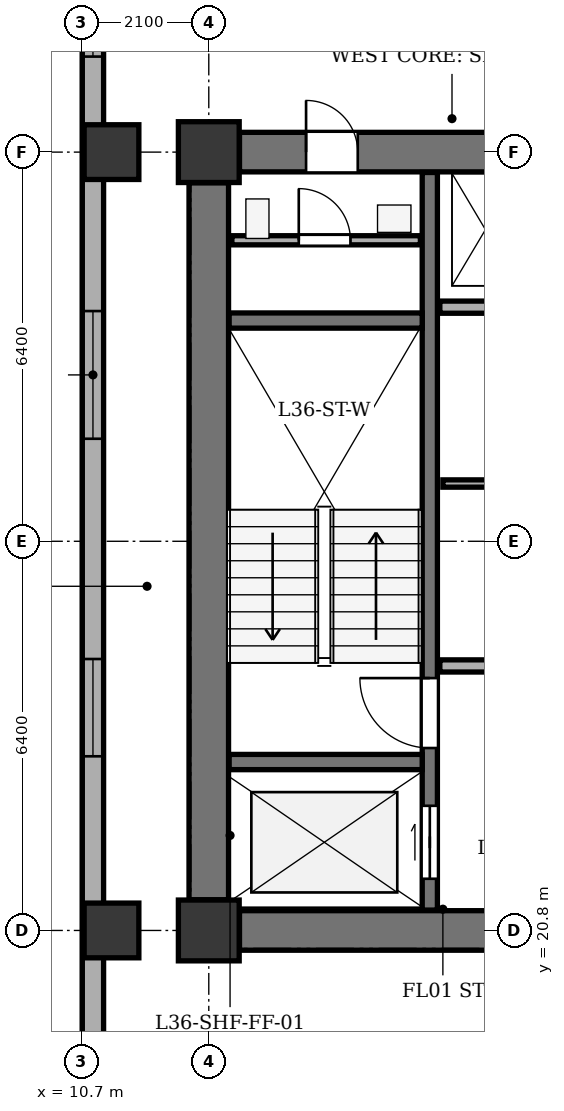
"""IFC4 building model, lengths in metres.
Left out: names, types, materials, properties, quantities, classifications, styles, units other than length and angle.
Written with IfcOpenShell. Run it as: python <this file> out.ifc"""

import sys

from ifc_helpers import new_model, si_unit, direction, frame, frame_2d, origin, origin_2d, place, context, subcontext, project, spatial, rectangle, extrude, element, fill, save


model = new_model("IFC4")
c1 = context("Model", 3, precision=1e-05, world=origin(), true_north=direction((0.0, 1.0)))
c2 = subcontext(c1, "Body", "Model", "MODEL_VIEW")
j1 = project(units=[si_unit("LENGTHUNIT", "METRE"), si_unit("PLANEANGLEUNIT", "RADIAN")], contexts=[c1])
p1 = place(None, origin())
s1 = spatial("IfcSite", under=j1, at=p1, CompositionType="ELEMENT")
p2 = place(p1, origin())
s2 = spatial("IfcBuilding", under=s1, at=p2, CompositionType="ELEMENT")
p3 = place(p2, frame((0.0, 0.0, 144.8)))
s3 = spatial("IfcBuildingStorey", under=s2, at=p3, CompositionType="ELEMENT", Elevation=144.8)
for number, where, z_axis, x_axis in (
    (1, (12.8, 20.8, 0.0), (0.0, 0.0, 1.0), (1.0, 0.0, 0.0)),
    (2, (12.8, 33.6, 0.0), (0.0, 0.0, 1.0), (1.0, 0.0, 0.0)),
):
    element("IfcColumn", number, at=place(p3, frame(where, z_axis=z_axis, x_axis=x_axis)), inside=s3, PredefinedType="COLUMN", context=c2, shape_type="SweptSolid", body=[
        extrude(rectangle(XDim=1.0, YDim=1.0, at=origin_2d()), origin(), (0.0, 0.0, 1.0), 3.5),
    ])
for number, where, z_axis, x_axis in (
    (3, (11.2, 20.8, 0.0), (0.0, 0.0, 1.0), (1.0, 0.0, 0.0)),
    (4, (11.2, 33.6, 0.0), (0.0, 0.0, 1.0), (1.0, 0.0, 0.0)),
):
    element("IfcColumn", number, at=place(p3, frame(where, z_axis=z_axis, x_axis=x_axis)), inside=s3, PredefinedType="COLUMN", context=c2, shape_type="SweptSolid", body=[
        extrude(rectangle(XDim=0.9, YDim=0.9, at=origin_2d()), origin(), (0.0, 0.0, 1.0), 3.5),
    ])
p4 = place(p3, frame((10.895, 6.5, 0.0), z_axis=(0.0, 0.0, 1.0), x_axis=(0.0, 1.0, 0.0)))
e5 = element("IfcWall", 5, at=p4, inside=s3, PredefinedType="STANDARD", context=c2, shape_type="SweptSolid", body=[
    extrude(rectangle(XDim=35.0, YDim=0.35, at=frame_2d((17.5, 0.0))), origin(), (0.0, 0.0, 1.0), 2.785),
])
p5 = place(p4, frame((3.31, 0.0, 0.75)))
e6 = element("IfcOpeningElement", 6, at=p5, cuts=e5, PredefinedType="OPENING", context=c2, shape_type="SweptSolid", body=[
    extrude(rectangle(XDim=1.6, YDim=1.75, at=frame_2d((0.8, 0.875))), frame((0.0, 0.185, 0.0), z_axis=(0.0, -1.0, 0.0), x_axis=(1.0, 0.0, 0.0)), (0.0, 0.0, 1.0), 0.37),
])
p6 = place(p4, frame((9.216, 0.0, 0.75)))
e7 = element("IfcOpeningElement", 7, at=p6, cuts=e5, PredefinedType="OPENING", context=c2, shape_type="SweptSolid", body=[
    extrude(rectangle(XDim=2.1, YDim=1.75, at=frame_2d((1.05, 0.875))), frame((0.0, 0.185, 0.0), z_axis=(0.0, -1.0, 0.0), x_axis=(1.0, 0.0, 0.0)), (0.0, 0.0, 1.0), 0.37),
])
p7 = place(p4, frame((17.164, 0.0, 0.75)))
e8 = element("IfcOpeningElement", 8, at=p7, cuts=e5, PredefinedType="OPENING", context=c2, shape_type="SweptSolid", body=[
    extrude(rectangle(XDim=1.6, YDim=1.75, at=frame_2d((0.8, 0.875))), frame((0.0, 0.185, 0.0), z_axis=(0.0, -1.0, 0.0), x_axis=(1.0, 0.0, 0.0)), (0.0, 0.0, 1.0), 0.37),
])
p8 = place(p4, frame((22.386, 0.0, 0.75)))
e9 = element("IfcOpeningElement", 9, at=p8, cuts=e5, PredefinedType="OPENING", context=c2, shape_type="SweptSolid", body=[
    extrude(rectangle(XDim=2.1, YDim=1.75, at=frame_2d((1.05, 0.875))), frame((0.0, 0.185, 0.0), z_axis=(0.0, -1.0, 0.0), x_axis=(1.0, 0.0, 0.0)), (0.0, 0.0, 1.0), 0.37),
])
p9 = place(p4, frame((28.671, 0.0, 0.75)))
e10 = element("IfcOpeningElement", 10, at=p9, cuts=e5, PredefinedType="OPENING", context=c2, shape_type="SweptSolid", body=[
    extrude(rectangle(XDim=1.6, YDim=1.75, at=frame_2d((0.8, 0.875))), frame((0.0, 0.185, 0.0), z_axis=(0.0, -1.0, 0.0), x_axis=(1.0, 0.0, 0.0)), (0.0, 0.0, 1.0), 0.37),
])
p10 = place(p4, frame((31.755, 0.0, 0.75)))
e11 = element("IfcOpeningElement", 11, at=p10, cuts=e5, PredefinedType="OPENING", context=c2, shape_type="SweptSolid", body=[
    extrude(rectangle(XDim=1.6, YDim=1.75, at=frame_2d((0.8, 0.875))), frame((0.0, 0.185, 0.0), z_axis=(0.0, -1.0, 0.0), x_axis=(1.0, 0.0, 0.0)), (0.0, 0.0, 1.0), 0.37),
])
p11 = place(p3, frame((12.8, 21.305, 0.0), z_axis=(0.0, 0.0, 1.0), x_axis=(0.0, 1.0, 0.0)))
e12 = element("IfcWall", 12, at=p11, inside=s3, PredefinedType="SHEAR", context=c2, shape_type="SweptSolid", body=[
    extrude(rectangle(XDim=11.79, YDim=0.65, at=frame_2d((5.895, 0.0))), origin(), (0.0, 0.0, 1.0), 3.2),
])
p12 = place(p3, frame((13.305, 20.8, 0.0), z_axis=(0.0, 0.0, 1.0), x_axis=(1.0, 0.0, 0.0)))
e13 = element("IfcWall", 13, at=p12, inside=s3, PredefinedType="SHEAR", context=c2, shape_type="SweptSolid", body=[
    extrude(rectangle(XDim=6.99, YDim=0.65, at=frame_2d((3.495, 0.0))), origin(), (0.0, 0.0, 1.0), 3.2),
])
p13 = place(p3, frame((13.305, 33.6, 0.0), z_axis=(0.0, 0.0, 1.0), x_axis=(1.0, 0.0, 0.0)))
e14 = element("IfcWall", 14, at=p13, inside=s3, PredefinedType="SHEAR", context=c2, shape_type="SweptSolid", body=[
    extrude(rectangle(XDim=6.99, YDim=0.65, at=frame_2d((3.495, 0.0))), origin(), (0.0, 0.0, 1.0), 3.2),
])
p14 = place(p13, frame((1.095, 0.0, 0.0)))
e15 = element("IfcOpeningElement", 15, at=p14, cuts=e14, PredefinedType="OPENING", context=c2, shape_type="SweptSolid", body=[
    extrude(rectangle(XDim=0.85, YDim=2.02, at=frame_2d((0.425, 1.01))), frame((0.0, 0.335, 0.0), z_axis=(0.0, -1.0, 0.0), x_axis=(1.0, 0.0, 0.0)), (0.0, 0.0, 1.0), 0.67),
])
p15 = place(p3, frame((16.435, 21.135, 0.0), z_axis=(0.0, 0.0, 1.0), x_axis=(0.0, 1.0, 0.0)))
e16 = element("IfcWall", 16, at=p15, inside=s3, PredefinedType="SHEAR", context=c2, shape_type="SweptSolid", body=[
    extrude(rectangle(XDim=12.13, YDim=0.25, at=frame_2d((6.065, 0.0))), origin(), (0.0, 0.0, 1.0), 3.2),
])
p16 = place(p15, frame((0.515, 0.0, 0.0)))
e17 = element("IfcOpeningElement", 17, at=p16, cuts=e16, PredefinedType="OPENING", context=c2, shape_type="SweptSolid", body=[
    extrude(rectangle(XDim=1.2, YDim=2.15, at=frame_2d((0.6, 1.075))), frame((0.0, 0.135, 0.0), z_axis=(0.0, -1.0, 0.0), x_axis=(1.0, 0.0, 0.0)), (0.0, 0.0, 1.0), 0.27),
])
p17 = place(p15, frame((2.665, 0.0, 0.0)))
e18 = element("IfcOpeningElement", 18, at=p17, cuts=e16, PredefinedType="OPENING", context=c2, shape_type="SweptSolid", body=[
    extrude(rectangle(XDim=1.15, YDim=2.15, at=frame_2d((0.575, 1.075))), frame((0.0, 0.135, 0.0), z_axis=(0.0, -1.0, 0.0), x_axis=(1.0, 0.0, 0.0)), (0.0, 0.0, 1.0), 0.27),
])
for number, where, z_axis, x_axis in (
    (19, (13.135, 23.57, 0.0), (0.0, 0.0, 1.0), (1.0, 0.0, 0.0)),
    (20, (13.135, 30.83, 0.0), (0.0, 0.0, 1.0), (1.0, 0.0, 0.0)),
):
    element("IfcWall", number, at=place(p3, frame(where, z_axis=z_axis, x_axis=x_axis)), inside=s3, PredefinedType="SHEAR", context=c2, shape_type="SweptSolid", body=[
        extrude(rectangle(XDim=3.175, YDim=0.25, at=frame_2d((1.587, 0.0))), origin(), (0.0, 0.0, 1.0), 3.2),
    ])
for number, where, z_axis, x_axis in (
    (21, (16.6, 25.15, 0.0), (0.0, 0.0, 1.0), (1.0, 0.0, 0.0)),
    (22, (16.6, 31.05, 0.0), (0.0, 0.0, 1.0), (1.0, 0.0, 0.0)),
):
    element("IfcWall", number, at=place(p3, frame(where, z_axis=z_axis, x_axis=x_axis)), inside=s3, PredefinedType="SOLIDWALL", context=c2, shape_type="SweptSolid", body=[
        extrude(rectangle(XDim=3.85, YDim=0.2, at=frame_2d((1.925, 0.0))), origin(), (0.0, 0.0, 1.0), 3.2),
    ])
p18 = place(p3, frame((13.18, 32.15, 0.0), z_axis=(0.0, 0.0, 1.0), x_axis=(1.0, 0.0, 0.0)))
e23 = element("IfcWall", 23, at=p18, inside=s3, PredefinedType="PARTITIONING", context=c2, shape_type="SweptSolid", body=[
    extrude(rectangle(XDim=3.1, YDim=0.15, at=frame_2d((1.55, 0.0))), origin(), (0.0, 0.0, 1.0), 3.2),
])
p19 = place(p18, frame((1.1, 0.0, 0.0)))
e24 = element("IfcOpeningElement", 24, at=p19, cuts=e23, PredefinedType="OPENING", context=c2, shape_type="SweptSolid", body=[
    extrude(rectangle(XDim=0.85, YDim=2.02, at=frame_2d((0.425, 1.01))), frame((0.0, 0.085, 0.0), z_axis=(0.0, -1.0, 0.0), x_axis=(1.0, 0.0, 0.0)), (0.0, 0.0, 1.0), 0.17),
])
p20 = place(p3, frame((16.65, 28.15, 0.0), z_axis=(0.0, 0.0, 1.0), x_axis=(1.0, 0.0, 0.0)))
e25 = element("IfcWall", 25, at=p20, inside=s3, PredefinedType="PARTITIONING", context=c2, shape_type="SweptSolid", body=[
    extrude(rectangle(XDim=8.885, YDim=0.12, at=frame_2d((4.442, 0.0))), origin(), (0.0, 0.0, 1.0), 3.2),
])
p21 = place(p7, origin())
e26 = element("IfcWindow", 26, at=p21, inside=s3, PartitioningType="SINGLE_PANEL", PredefinedType="WINDOW", context=c2, shape_type="SweptSolid", body=[
    extrude(rectangle(XDim=1.6, YDim=1.75, at=frame_2d((0.8, 0.875))), frame((0.0, -0.01, 0.0), z_axis=(0.0, -1.0, 0.0), x_axis=(1.0, 0.0, 0.0)), (0.0, 0.0, 1.0), 0.06),
])
fill(e8, e26)
p22 = place(p8, origin())
e27 = element("IfcWindow", 27, at=p22, inside=s3, PartitioningType="SINGLE_PANEL", PredefinedType="WINDOW", context=c2, shape_type="SweptSolid", body=[
    extrude(rectangle(XDim=2.1, YDim=1.75, at=frame_2d((1.05, 0.875))), frame((0.0, -0.01, 0.0), z_axis=(0.0, -1.0, 0.0), x_axis=(1.0, 0.0, 0.0)), (0.0, 0.0, 1.0), 0.06),
])
fill(e9, e27)
p23 = place(p9, origin())
e28 = element("IfcWindow", 28, at=p23, inside=s3, PartitioningType="SINGLE_PANEL", PredefinedType="WINDOW", context=c2, shape_type="SweptSolid", body=[
    extrude(rectangle(XDim=1.6, YDim=1.75, at=frame_2d((0.8, 0.875))), frame((0.0, -0.01, 0.0), z_axis=(0.0, -1.0, 0.0), x_axis=(1.0, 0.0, 0.0)), (0.0, 0.0, 1.0), 0.06),
])
fill(e10, e28)
p24 = place(p14, origin())
e29 = element("IfcDoor", 29, at=p24, inside=s3, OperationType="SINGLE_SWING_LEFT", PredefinedType="DOOR", context=c2, shape_type="SweptSolid", body=[
    extrude(rectangle(XDim=0.85, YDim=2.02, at=frame_2d((0.425, 1.01))), frame((0.0, 0.025, 0.0), z_axis=(0.0, -1.0, 0.0), x_axis=(1.0, 0.0, 0.0)), (0.0, 0.0, 1.0), 0.05),
])
fill(e15, e29)
p25 = place(p16, origin())
e30 = element("IfcDoor", 30, at=p25, inside=s3, OperationType="DOUBLE_DOOR_SLIDING", PredefinedType="DOOR", context=c2, shape_type="SweptSolid", body=[
    extrude(rectangle(XDim=1.2, YDim=2.15, at=frame_2d((0.6, 1.075))), frame((0.0, 0.025, 0.0), z_axis=(0.0, -1.0, 0.0), x_axis=(1.0, 0.0, 0.0)), (0.0, 0.0, 1.0), 0.05),
])
fill(e17, e30)
p26 = place(p17, origin())
e31 = element("IfcDoor", 31, at=p26, inside=s3, OperationType="SINGLE_SWING_RIGHT", PredefinedType="DOOR", context=c2, shape_type="SweptSolid", body=[
    extrude(rectangle(XDim=1.15, YDim=2.15, at=frame_2d((0.575, 1.075))), frame((0.0, 0.025, 0.0), z_axis=(0.0, -1.0, 0.0), x_axis=(1.0, 0.0, 0.0)), (0.0, 0.0, 1.0), 0.05),
])
fill(e18, e31)
p27 = place(p19, origin())
e32 = element("IfcDoor", 32, at=p27, inside=s3, OperationType="SINGLE_SWING_LEFT", PredefinedType="DOOR", context=c2, shape_type="SweptSolid", body=[
    extrude(rectangle(XDim=0.85, YDim=2.02, at=frame_2d((0.425, 1.01))), frame((0.0, 0.025, 0.0), z_axis=(0.0, -1.0, 0.0), x_axis=(1.0, 0.0, 0.0)), (0.0, 0.0, 1.0), 0.05),
])
fill(e24, e32)
save(model, sys.argv[1])
